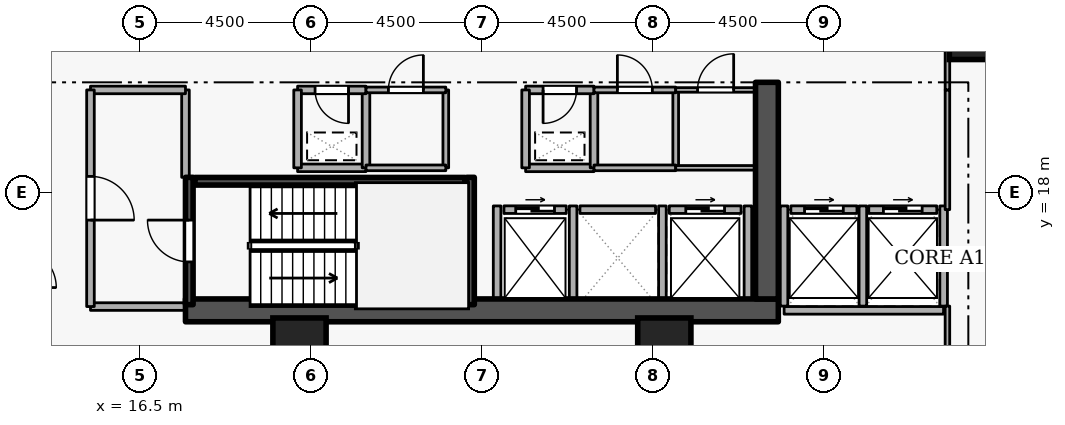
"""IFC4 building model, lengths in metres.
Left out: names, types, materials, properties, quantities, classifications, styles, units other than length and angle.
Written with IfcOpenShell. Run it as: python <this file> out.ifc"""

import sys

from ifc_helpers import new_model, si_unit, direction, frame, frame_2d, origin, origin_2d, place, context, subcontext, project, spatial, rectangle, extrude, element, fill, save


model = new_model("IFC4")
c1 = context("Model", 3, precision=1e-05, world=origin(), true_north=direction((0.0, 1.0)))
c2 = subcontext(c1, "Body", "Model", "MODEL_VIEW")
j1 = project(units=[si_unit("LENGTHUNIT", "METRE"), si_unit("PLANEANGLEUNIT", "RADIAN")], contexts=[c1])
p1 = place(None, origin())
s1 = spatial("IfcSite", under=j1, at=p1, CompositionType="ELEMENT")
p2 = place(p1, origin())
s2 = spatial("IfcBuilding", under=s1, at=p2, CompositionType="ELEMENT")
p3 = place(p2, frame((0.0, 0.0, 53.7)))
s3 = spatial("IfcBuildingStorey", under=s2, at=p3, CompositionType="ELEMENT", Elevation=53.7)
p4 = place(p3, frame((17.7, 14.9, 0.0), z_axis=(0.0, 0.0, 1.0), x_axis=(1.0, 0.0, 0.0)))
e1 = element("IfcWall", 1, at=p4, inside=s3, PredefinedType="SHEAR", context=c2, shape_type="SweptSolid", body=[
    extrude(rectangle(XDim=15.6, YDim=0.6, at=frame_2d((7.8, 0.0))), origin(), (0.0, 0.0, 1.0), 3.6),
])
p5 = place(p3, frame((33.0, 15.2, 0.0), z_axis=(0.0, 0.0, 1.0), x_axis=(0.0, 1.0, 0.0)))
e2 = element("IfcWall", 2, at=p5, inside=s3, PredefinedType="SHEAR", context=c2, shape_type="SweptSolid", body=[
    extrude(rectangle(XDim=5.7, YDim=0.6, at=frame_2d((2.85, 0.0))), origin(), (0.0, 0.0, 1.0), 3.6),
])
for number, where, z_axis, x_axis in (
    (3, (38.5, 22.2, 0.0), (0.0, 0.0, 1.0), (1.0, 0.0, 0.0)),
    (4, (20.7, 14.0, 0.0), (0.0, 0.0, 1.0), (1.0, 0.0, 0.0)),
    (5, (30.3, 14.0, 0.0), (0.0, 0.0, 1.0), (1.0, 0.0, 0.0)),
):
    element("IfcColumn", number, at=place(p3, frame(where, z_axis=z_axis, x_axis=x_axis)), inside=s3, PredefinedType="COLUMN", context=c2, shape_type="SweptSolid", body=[
        extrude(rectangle(XDim=1.4, YDim=1.4, at=origin_2d()), origin(), (0.0, 0.0, 1.0), 3.6),
    ])
p6 = place(p3, frame((26.08, 17.55, 0.0), z_axis=(0.0, 0.0, 1.0), x_axis=(1.0, 0.0, 0.0)))
e6 = element("IfcWall", 6, at=p6, inside=s3, PredefinedType="STANDARD", context=c2, shape_type="SweptSolid", body=[
    extrude(rectangle(XDim=1.64, YDim=0.2, at=frame_2d((0.82, 0.0))), origin(), (0.0, 0.0, 1.0), 3.34),
])
p7 = place(p6, frame((0.31, 0.0, 0.0)))
e7 = element("IfcOpeningElement", 7, at=p7, cuts=e6, PredefinedType="OPENING", context=c2, shape_type="SweptSolid", body=[
    extrude(rectangle(XDim=1.02, YDim=2.06, at=frame_2d((0.51, 1.03))), frame((0.0, 0.11, 0.0), z_axis=(0.0, -1.0, 0.0), x_axis=(1.0, 0.0, 0.0)), (0.0, 0.0, 1.0), 0.22),
])
p8 = place(p3, frame((28.08, 17.55, 0.0), z_axis=(0.0, 0.0, 1.0), x_axis=(1.0, 0.0, 0.0)))
e8 = element("IfcWall", 8, at=p8, inside=s3, PredefinedType="STANDARD", context=c2, shape_type="SweptSolid", body=[
    extrude(rectangle(XDim=1.99, YDim=0.2, at=frame_2d((0.995, 0.0))), origin(), (0.0, 0.0, 1.0), 3.34),
])
p9 = place(p3, frame((30.43, 17.55, 0.0), z_axis=(0.0, 0.0, 1.0), x_axis=(1.0, 0.0, 0.0)))
e9 = element("IfcWall", 9, at=p9, inside=s3, PredefinedType="STANDARD", context=c2, shape_type="SweptSolid", body=[
    extrude(rectangle(XDim=1.89, YDim=0.2, at=frame_2d((0.945, 0.0))), origin(), (0.0, 0.0, 1.0), 3.34),
])
p10 = place(p9, frame((0.435, 0.0, 0.0)))
e10 = element("IfcOpeningElement", 10, at=p10, cuts=e9, PredefinedType="OPENING", context=c2, shape_type="SweptSolid", body=[
    extrude(rectangle(XDim=1.02, YDim=2.06, at=frame_2d((0.51, 1.03))), frame((0.0, 0.11, 0.0), z_axis=(0.0, -1.0, 0.0), x_axis=(1.0, 0.0, 0.0)), (0.0, 0.0, 1.0), 0.22),
])
p11 = place(p3, frame((33.63, 17.55, 0.0), z_axis=(0.0, 0.0, 1.0), x_axis=(1.0, 0.0, 0.0)))
e11 = element("IfcWall", 11, at=p11, inside=s3, PredefinedType="STANDARD", context=c2, shape_type="SweptSolid", body=[
    extrude(rectangle(XDim=1.74, YDim=0.2, at=frame_2d((0.87, 0.0))), origin(), (0.0, 0.0, 1.0), 3.34),
])
p12 = place(p11, frame((0.36, 0.0, 0.0)))
e12 = element("IfcOpeningElement", 12, at=p12, cuts=e11, PredefinedType="OPENING", context=c2, shape_type="SweptSolid", body=[
    extrude(rectangle(XDim=1.02, YDim=2.06, at=frame_2d((0.51, 1.03))), frame((0.0, 0.11, 0.0), z_axis=(0.0, -1.0, 0.0), x_axis=(1.0, 0.0, 0.0)), (0.0, 0.0, 1.0), 0.22),
])
p13 = place(p3, frame((35.68, 17.55, 0.0), z_axis=(0.0, 0.0, 1.0), x_axis=(1.0, 0.0, 0.0)))
e13 = element("IfcWall", 13, at=p13, inside=s3, PredefinedType="STANDARD", context=c2, shape_type="SweptSolid", body=[
    extrude(rectangle(XDim=1.79, YDim=0.2, at=frame_2d((0.895, 0.0))), origin(), (0.0, 0.0, 1.0), 3.34),
])
p14 = place(p13, frame((0.385, 0.0, 0.0)))
e14 = element("IfcOpeningElement", 14, at=p14, cuts=e13, PredefinedType="OPENING", context=c2, shape_type="SweptSolid", body=[
    extrude(rectangle(XDim=1.02, YDim=2.06, at=frame_2d((0.51, 1.03))), frame((0.0, 0.11, 0.0), z_axis=(0.0, -1.0, 0.0), x_axis=(1.0, 0.0, 0.0)), (0.0, 0.0, 1.0), 0.22),
])
for number, where, z_axis, x_axis in (
    (15, (27.9, 15.212, 0.0), (0.0, 0.0, 1.0), (0.0, 1.0, 0.0)),
    (16, (25.9, 15.212, 0.0), (0.0, 0.0, 1.0), (0.0, 1.0, 0.0)),
    (17, (30.25, 15.212, 0.0), (0.0, 0.0, 1.0), (0.0, 1.0, 0.0)),
    (18, (32.5, 15.212, 0.0), (0.0, 0.0, 1.0), (0.0, 1.0, 0.0)),
):
    element("IfcWall", number, at=place(p3, frame(where, z_axis=z_axis, x_axis=x_axis)), inside=s3, PredefinedType="STANDARD", context=c2, shape_type="SweptSolid", body=[
        extrude(rectangle(XDim=2.436, YDim=0.2, at=frame_2d((1.218, 0.0))), origin(), (0.0, 0.0, 1.0), 3.34),
    ])
p15 = place(p3, frame((33.452, 14.9, 0.0), z_axis=(0.0, 0.0, 1.0), x_axis=(1.0, 0.0, 0.0)))
e19 = element("IfcWall", 19, at=p15, inside=s3, PredefinedType="STANDARD", context=c2, shape_type="SweptSolid", body=[
    extrude(rectangle(XDim=4.196, YDim=0.2, at=frame_2d((2.098, 0.0))), origin(), (0.0, 0.0, 1.0), 3.34),
])
for number, where, z_axis, x_axis in (
    (20, (35.525, 15.012, 0.0), (0.0, 0.0, 1.0), (0.0, 1.0, 0.0)),
    (21, (33.45, 15.012, 0.0), (0.0, 0.0, 1.0), (0.0, 1.0, 0.0)),
    (22, (37.65, 15.012, 0.0), (0.0, 0.0, 1.0), (0.0, 1.0, 0.0)),
):
    element("IfcWall", number, at=place(p3, frame(where, z_axis=z_axis, x_axis=x_axis)), inside=s3, PredefinedType="STANDARD", context=c2, shape_type="SweptSolid", body=[
        extrude(rectangle(XDim=2.636, YDim=0.2, at=frame_2d((1.318, 0.0))), origin(), (0.0, 0.0, 1.0), 3.34),
    ])
p16 = place(p3, frame((17.8, 15.05, 0.0), z_axis=(0.0, 0.0, 1.0), x_axis=(0.0, 1.0, 0.0)))
e23 = element("IfcWall", 23, at=p16, inside=s3, PredefinedType="SHEAR", context=c2, shape_type="SweptSolid", body=[
    extrude(rectangle(XDim=3.35, YDim=0.2, at=frame_2d((1.675, 0.0))), origin(), (0.0, 0.0, 1.0), 3.6),
])
p17 = place(p16, frame((1.125, 0.0, 0.0)))
e24 = element("IfcOpeningElement", 24, at=p17, cuts=e23, PredefinedType="OPENING", context=c2, shape_type="SweptSolid", body=[
    extrude(rectangle(XDim=1.1, YDim=2.1, at=frame_2d((0.55, 1.05))), frame((0.0, 0.11, 0.0), z_axis=(0.0, -1.0, 0.0), x_axis=(1.0, 0.0, 0.0)), (0.0, 0.0, 1.0), 0.22),
])
p18 = place(p3, frame((25.2, 18.4, 0.0), z_axis=(0.0, 0.0, 1.0), x_axis=(0.0, -1.0, 0.0)))
e25 = element("IfcWall", 25, at=p18, inside=s3, PredefinedType="SHEAR", context=c2, shape_type="SweptSolid", body=[
    extrude(rectangle(XDim=3.35, YDim=0.2, at=frame_2d((1.675, 0.0))), origin(), (0.0, 0.0, 1.0), 3.6),
])
p19 = place(p3, frame((25.05, 18.297, 0.0), z_axis=(0.0, 0.0, 1.0), x_axis=(-1.0, 0.0, 0.0)))
e26 = element("IfcWall", 26, at=p19, inside=s3, PredefinedType="SHEAR", context=c2, shape_type="SweptSolid", body=[
    extrude(rectangle(XDim=7.1, YDim=0.2, at=frame_2d((3.55, 0.0))), origin(), (0.0, 0.0, 1.0), 3.6),
])
p20 = place(p3, frame((15.2, 15.0, 0.0), z_axis=(0.0, 0.0, 1.0), x_axis=(1.0, 0.0, 0.0)))
e27 = element("IfcWall", 27, at=p20, inside=s3, PredefinedType="STANDARD", context=c2, shape_type="SweptSolid", body=[
    extrude(rectangle(XDim=2.5, YDim=0.2, at=frame_2d((1.25, 0.0))), origin(), (0.0, 0.0, 1.0), 3.34),
])
p21 = place(p3, frame((17.7, 18.4, 0.0), z_axis=(0.0, 0.0, 1.0), x_axis=(0.0, 1.0, 0.0)))
e28 = element("IfcWall", 28, at=p21, inside=s3, PredefinedType="STANDARD", context=c2, shape_type="SweptSolid", body=[
    extrude(rectangle(XDim=2.3, YDim=0.2, at=frame_2d((1.15, 0.0))), origin(), (0.0, 0.0, 1.0), 2.545),
])
p22 = place(p3, frame((17.7, 20.7, 0.0), z_axis=(0.0, 0.0, 1.0), x_axis=(-1.0, 0.0, 0.0)))
e29 = element("IfcWall", 29, at=p22, inside=s3, PredefinedType="STANDARD", context=c2, shape_type="SweptSolid", body=[
    extrude(rectangle(XDim=2.5, YDim=0.2, at=frame_2d((1.25, 0.0))), origin(), (0.0, 0.0, 1.0), 3.34),
])
p23 = place(p3, frame((15.2, 20.7, 0.0), z_axis=(0.0, 0.0, 1.0), x_axis=(0.0, -1.0, 0.0)))
e30 = element("IfcWall", 30, at=p23, inside=s3, PredefinedType="STANDARD", context=c2, shape_type="SweptSolid", body=[
    extrude(rectangle(XDim=5.7, YDim=0.2, at=frame_2d((2.85, 0.0))), origin(), (0.0, 0.0, 1.0), 3.34),
])
p24 = place(p23, frame((2.275, 0.0, 0.0)))
e31 = element("IfcOpeningElement", 31, at=p24, cuts=e30, PredefinedType="OPENING", context=c2, shape_type="SweptSolid", body=[
    extrude(rectangle(XDim=1.15, YDim=2.1, at=frame_2d((0.575, 1.05))), frame((0.0, 0.11, 0.0), z_axis=(0.0, -1.0, 0.0), x_axis=(1.0, 0.0, 0.0)), (0.0, 0.0, 1.0), 0.22),
])
p25 = place(p3, frame((26.65, 18.65, 0.0), z_axis=(0.0, 0.0, 1.0), x_axis=(1.0, 0.0, 0.0)))
e32 = element("IfcWall", 32, at=p25, inside=s3, PredefinedType="STANDARD", context=c2, shape_type="SweptSolid", body=[
    extrude(rectangle(XDim=1.8, YDim=0.2, at=frame_2d((0.9, 0.0))), origin(), (0.0, 0.0, 1.0), 3.34),
])
p26 = place(p3, frame((28.45, 18.65, 0.0), z_axis=(0.0, 0.0, 1.0), x_axis=(0.0, 1.0, 0.0)))
e33 = element("IfcWall", 33, at=p26, inside=s3, PredefinedType="STANDARD", context=c2, shape_type="SweptSolid", body=[
    extrude(rectangle(XDim=2.05, YDim=0.2, at=frame_2d((1.025, 0.0))), origin(), (0.0, 0.0, 1.0), 3.34),
])
p27 = place(p3, frame((28.45, 20.7, 0.0), z_axis=(0.0, 0.0, 1.0), x_axis=(-1.0, 0.0, 0.0)))
e34 = element("IfcWall", 34, at=p27, inside=s3, PredefinedType="STANDARD", context=c2, shape_type="SweptSolid", body=[
    extrude(rectangle(XDim=1.8, YDim=0.2, at=frame_2d((0.9, 0.0))), origin(), (0.0, 0.0, 1.0), 3.34),
])
p28 = place(p27, frame((0.46, 0.0, 0.0)))
e35 = element("IfcOpeningElement", 35, at=p28, cuts=e34, PredefinedType="OPENING", context=c2, shape_type="SweptSolid", body=[
    extrude(rectangle(XDim=0.88, YDim=2.04, at=frame_2d((0.44, 1.02))), frame((0.0, 0.11, 0.0), z_axis=(0.0, -1.0, 0.0), x_axis=(1.0, 0.0, 0.0)), (0.0, 0.0, 1.0), 0.22),
])
p29 = place(p3, frame((26.65, 20.7, 0.0), z_axis=(0.0, 0.0, 1.0), x_axis=(0.0, -1.0, 0.0)))
e36 = element("IfcWall", 36, at=p29, inside=s3, PredefinedType="STANDARD", context=c2, shape_type="SweptSolid", body=[
    extrude(rectangle(XDim=2.05, YDim=0.2, at=frame_2d((1.025, 0.0))), origin(), (0.0, 0.0, 1.0), 3.34),
])
p30 = place(p3, frame((20.65, 18.65, 0.0), z_axis=(0.0, 0.0, 1.0), x_axis=(1.0, 0.0, 0.0)))
e37 = element("IfcWall", 37, at=p30, inside=s3, PredefinedType="STANDARD", context=c2, shape_type="SweptSolid", body=[
    extrude(rectangle(XDim=1.8, YDim=0.2, at=frame_2d((0.9, 0.0))), origin(), (0.0, 0.0, 1.0), 3.34),
])
p31 = place(p3, frame((22.45, 18.65, 0.0), z_axis=(0.0, 0.0, 1.0), x_axis=(0.0, 1.0, 0.0)))
e38 = element("IfcWall", 38, at=p31, inside=s3, PredefinedType="STANDARD", context=c2, shape_type="SweptSolid", body=[
    extrude(rectangle(XDim=2.05, YDim=0.2, at=frame_2d((1.025, 0.0))), origin(), (0.0, 0.0, 1.0), 3.34),
])
p32 = place(p3, frame((22.45, 20.7, 0.0), z_axis=(0.0, 0.0, 1.0), x_axis=(-1.0, 0.0, 0.0)))
e39 = element("IfcWall", 39, at=p32, inside=s3, PredefinedType="STANDARD", context=c2, shape_type="SweptSolid", body=[
    extrude(rectangle(XDim=1.8, YDim=0.2, at=frame_2d((0.9, 0.0))), origin(), (0.0, 0.0, 1.0), 3.34),
])
p33 = place(p32, frame((0.46, 0.0, 0.0)))
e40 = element("IfcOpeningElement", 40, at=p33, cuts=e39, PredefinedType="OPENING", context=c2, shape_type="SweptSolid", body=[
    extrude(rectangle(XDim=0.88, YDim=2.04, at=frame_2d((0.44, 1.02))), frame((0.0, 0.11, 0.0), z_axis=(0.0, -1.0, 0.0), x_axis=(1.0, 0.0, 0.0)), (0.0, 0.0, 1.0), 0.22),
])
p34 = place(p3, frame((20.65, 20.7, 0.0), z_axis=(0.0, 0.0, 1.0), x_axis=(0.0, -1.0, 0.0)))
e41 = element("IfcWall", 41, at=p34, inside=s3, PredefinedType="STANDARD", context=c2, shape_type="SweptSolid", body=[
    extrude(rectangle(XDim=2.05, YDim=0.2, at=frame_2d((1.025, 0.0))), origin(), (0.0, 0.0, 1.0), 3.34),
])
p35 = place(p3, frame((24.55, 20.7, 0.0), z_axis=(0.0, 0.0, 1.0), x_axis=(0.0, -1.0, 0.0)))
e42 = element("IfcWall", 42, at=p35, inside=s3, PredefinedType="PARTITIONING", context=c2, shape_type="SweptSolid", body=[
    extrude(rectangle(XDim=2.05, YDim=0.15, at=frame_2d((1.025, 0.0))), origin(), (0.0, 0.0, 1.0), 3.34),
])
p36 = place(p3, frame((24.55, 18.65, 0.0), z_axis=(0.0, 0.0, 1.0), x_axis=(-1.0, 0.0, 0.0)))
e43 = element("IfcWall", 43, at=p36, inside=s3, PredefinedType="PARTITIONING", context=c2, shape_type="SweptSolid", body=[
    extrude(rectangle(XDim=2.1, YDim=0.15, at=frame_2d((1.05, 0.0))), origin(), (0.0, 0.0, 1.0), 3.34),
])
p37 = place(p3, frame((22.45, 20.7, 0.0), z_axis=(0.0, 0.0, 1.0), x_axis=(1.0, 0.0, 0.0)))
e44 = element("IfcWall", 44, at=p37, inside=s3, PredefinedType="PARTITIONING", context=c2, shape_type="SweptSolid", body=[
    extrude(rectangle(XDim=2.1, YDim=0.15, at=frame_2d((1.05, 0.0))), origin(), (0.0, 0.0, 1.0), 3.34),
])
p38 = place(p37, frame((0.59, 0.0, 0.0)))
e45 = element("IfcOpeningElement", 45, at=p38, cuts=e44, PredefinedType="OPENING", context=c2, shape_type="SweptSolid", body=[
    extrude(rectangle(XDim=0.92, YDim=2.08, at=frame_2d((0.46, 1.04))), frame((0.0, 0.085, 0.0), z_axis=(0.0, -1.0, 0.0), x_axis=(1.0, 0.0, 0.0)), (0.0, 0.0, 1.0), 0.17),
])
p39 = place(p3, frame((30.6, 20.7, 0.0), z_axis=(0.0, 0.0, 1.0), x_axis=(0.0, -1.0, 0.0)))
e46 = element("IfcWall", 46, at=p39, inside=s3, PredefinedType="PARTITIONING", context=c2, shape_type="SweptSolid", body=[
    extrude(rectangle(XDim=2.05, YDim=0.15, at=frame_2d((1.025, 0.0))), origin(), (0.0, 0.0, 1.0), 3.34),
])
p40 = place(p3, frame((30.6, 18.65, 0.0), z_axis=(0.0, 0.0, 1.0), x_axis=(-1.0, 0.0, 0.0)))
e47 = element("IfcWall", 47, at=p40, inside=s3, PredefinedType="PARTITIONING", context=c2, shape_type="SweptSolid", body=[
    extrude(rectangle(XDim=2.15, YDim=0.15, at=frame_2d((1.075, 0.0))), origin(), (0.0, 0.0, 1.0), 3.34),
])
p41 = place(p3, frame((28.45, 20.7, 0.0), z_axis=(0.0, 0.0, 1.0), x_axis=(1.0, 0.0, 0.0)))
e48 = element("IfcWall", 48, at=p41, inside=s3, PredefinedType="PARTITIONING", context=c2, shape_type="SweptSolid", body=[
    extrude(rectangle(XDim=2.15, YDim=0.15, at=frame_2d((1.075, 0.0))), origin(), (0.0, 0.0, 1.0), 3.34),
])
p42 = place(p41, frame((0.615, 0.0, 0.0)))
e49 = element("IfcOpeningElement", 49, at=p42, cuts=e48, PredefinedType="OPENING", context=c2, shape_type="SweptSolid", body=[
    extrude(rectangle(XDim=0.92, YDim=2.08, at=frame_2d((0.46, 1.04))), frame((0.0, 0.085, 0.0), z_axis=(0.0, -1.0, 0.0), x_axis=(1.0, 0.0, 0.0)), (0.0, 0.0, 1.0), 0.17),
])
p43 = place(p3, frame((32.7, 18.65, 0.0), z_axis=(0.0, 0.0, 1.0), x_axis=(-1.0, 0.0, 0.0)))
e50 = element("IfcWall", 50, at=p43, inside=s3, PredefinedType="PARTITIONING", context=c2, shape_type="SweptSolid", body=[
    extrude(rectangle(XDim=2.1, YDim=0.12, at=frame_2d((1.05, 0.0))), origin(), (0.0, 0.0, 1.0), 3.34),
])
p44 = place(p3, frame((30.6, 20.7, 0.0), z_axis=(0.0, 0.0, 1.0), x_axis=(1.0, 0.0, 0.0)))
e51 = element("IfcWall", 51, at=p44, inside=s3, PredefinedType="PARTITIONING", context=c2, shape_type="SweptSolid", body=[
    extrude(rectangle(XDim=2.1, YDim=0.12, at=frame_2d((1.05, 0.0))), origin(), (0.0, 0.0, 1.0), 3.34),
])
p45 = place(p44, frame((0.575, 0.0, 0.0)))
e52 = element("IfcOpeningElement", 52, at=p45, cuts=e51, PredefinedType="OPENING", context=c2, shape_type="SweptSolid", body=[
    extrude(rectangle(XDim=0.95, YDim=2.1, at=frame_2d((0.475, 1.05))), frame((0.0, 0.07, 0.0), z_axis=(0.0, -1.0, 0.0), x_axis=(1.0, 0.0, 0.0)), (0.0, 0.0, 1.0), 0.14),
])
p46 = place(p3, frame((37.75, 17.55, 0.0), z_axis=(0.0, 0.0, 1.0), x_axis=(0.0, 1.0, 0.0)))
e53 = element("IfcWall", 53, at=p46, inside=s3, PredefinedType="PARTITIONING", context=c2, shape_type="SweptSolid", body=[
    extrude(rectangle(XDim=3.15, YDim=0.12, at=frame_2d((1.575, 0.0))), origin(), (0.0, 0.0, 1.0), 3.34),
])
p47 = place(p3, frame((37.75, 20.7, 0.0), z_axis=(0.0, 0.0, 1.0), x_axis=(0.0, 1.0, 0.0)))
e54 = element("IfcWall", 54, at=p47, inside=s3, PredefinedType="PARTITIONING", context=c2, shape_type="SweptSolid", body=[
    extrude(rectangle(XDim=1.85, YDim=0.12, at=frame_2d((0.925, 0.0))), origin(), (0.0, 0.0, 1.0), 3.34),
])
p48 = place(p3, frame((37.75, 13.15, 0.0), z_axis=(0.0, 0.0, 1.0), x_axis=(0.0, 1.0, 0.0)))
e55 = element("IfcWall", 55, at=p48, inside=s3, PredefinedType="PARTITIONING", context=c2, shape_type="SweptSolid", body=[
    extrude(rectangle(XDim=1.862, YDim=0.12, at=frame_2d((0.931, 0.0))), origin(), (0.0, 0.0, 1.0), 3.34),
])
p49 = place(p7, origin())
e56 = element("IfcDoor", 56, at=p49, inside=s3, OperationType="SLIDING_TO_LEFT", PredefinedType="DOOR", context=c2, shape_type="SweptSolid", body=[
    extrude(rectangle(XDim=1.02, YDim=2.06, at=frame_2d((0.51, 1.03))), frame((0.0, 0.025, 0.0), z_axis=(0.0, -1.0, 0.0), x_axis=(1.0, 0.0, 0.0)), (0.0, 0.0, 1.0), 0.05),
])
fill(e7, e56)
p50 = place(p10, origin())
e57 = element("IfcDoor", 57, at=p50, inside=s3, OperationType="SLIDING_TO_LEFT", PredefinedType="DOOR", context=c2, shape_type="SweptSolid", body=[
    extrude(rectangle(XDim=1.02, YDim=2.06, at=frame_2d((0.51, 1.03))), frame((0.0, 0.025, 0.0), z_axis=(0.0, -1.0, 0.0), x_axis=(1.0, 0.0, 0.0)), (0.0, 0.0, 1.0), 0.05),
])
fill(e10, e57)
p51 = place(p12, origin())
e58 = element("IfcDoor", 58, at=p51, inside=s3, OperationType="SLIDING_TO_LEFT", PredefinedType="DOOR", context=c2, shape_type="SweptSolid", body=[
    extrude(rectangle(XDim=1.02, YDim=2.06, at=frame_2d((0.51, 1.03))), frame((0.0, 0.025, 0.0), z_axis=(0.0, -1.0, 0.0), x_axis=(1.0, 0.0, 0.0)), (0.0, 0.0, 1.0), 0.05),
])
fill(e12, e58)
p52 = place(p14, origin())
e59 = element("IfcDoor", 59, at=p52, inside=s3, OperationType="SLIDING_TO_LEFT", PredefinedType="DOOR", context=c2, shape_type="SweptSolid", body=[
    extrude(rectangle(XDim=1.02, YDim=2.06, at=frame_2d((0.51, 1.03))), frame((0.0, 0.025, 0.0), z_axis=(0.0, -1.0, 0.0), x_axis=(1.0, 0.0, 0.0)), (0.0, 0.0, 1.0), 0.05),
])
fill(e14, e59)
p53 = place(p17, origin())
e60 = element("IfcDoor", 60, at=p53, inside=s3, OperationType="SINGLE_SWING_RIGHT", PredefinedType="DOOR", context=c2, shape_type="SweptSolid", body=[
    extrude(rectangle(XDim=1.1, YDim=2.1, at=frame_2d((0.55, 1.05))), frame((0.0, 0.025, 0.0), z_axis=(0.0, -1.0, 0.0), x_axis=(1.0, 0.0, 0.0)), (0.0, 0.0, 1.0), 0.05),
])
fill(e24, e60)
p54 = place(p24, origin())
e61 = element("IfcDoor", 61, at=p54, inside=s3, OperationType="SINGLE_SWING_RIGHT", PredefinedType="DOOR", context=c2, shape_type="SweptSolid", body=[
    extrude(rectangle(XDim=1.15, YDim=2.1, at=frame_2d((0.575, 1.05))), frame((0.0, 0.025, 0.0), z_axis=(0.0, -1.0, 0.0), x_axis=(1.0, 0.0, 0.0)), (0.0, 0.0, 1.0), 0.05),
])
fill(e31, e61)
p55 = place(p28, origin())
e62 = element("IfcDoor", 62, at=p55, inside=s3, OperationType="SINGLE_SWING_RIGHT", PredefinedType="DOOR", context=c2, shape_type="SweptSolid", body=[
    extrude(rectangle(XDim=0.88, YDim=2.04, at=frame_2d((0.44, 1.02))), frame((0.0, 0.025, 0.0), z_axis=(0.0, -1.0, 0.0), x_axis=(1.0, 0.0, 0.0)), (0.0, 0.0, 1.0), 0.05),
])
fill(e35, e62)
p56 = place(p33, origin())
e63 = element("IfcDoor", 63, at=p56, inside=s3, OperationType="SINGLE_SWING_LEFT", PredefinedType="DOOR", context=c2, shape_type="SweptSolid", body=[
    extrude(rectangle(XDim=0.88, YDim=2.04, at=frame_2d((0.44, 1.02))), frame((0.0, 0.025, 0.0), z_axis=(0.0, -1.0, 0.0), x_axis=(1.0, 0.0, 0.0)), (0.0, 0.0, 1.0), 0.05),
])
fill(e40, e63)
p57 = place(p38, origin())
e64 = element("IfcDoor", 64, at=p57, inside=s3, OperationType="SINGLE_SWING_RIGHT", PredefinedType="DOOR", context=c2, shape_type="SweptSolid", body=[
    extrude(rectangle(XDim=0.92, YDim=2.08, at=frame_2d((0.46, 1.04))), frame((0.0, 0.025, 0.0), z_axis=(0.0, -1.0, 0.0), x_axis=(1.0, 0.0, 0.0)), (0.0, 0.0, 1.0), 0.05),
])
fill(e45, e64)
p58 = place(p42, origin())
e65 = element("IfcDoor", 65, at=p58, inside=s3, OperationType="SINGLE_SWING_LEFT", PredefinedType="DOOR", context=c2, shape_type="SweptSolid", body=[
    extrude(rectangle(XDim=0.92, YDim=2.08, at=frame_2d((0.46, 1.04))), frame((0.0, 0.025, 0.0), z_axis=(0.0, -1.0, 0.0), x_axis=(1.0, 0.0, 0.0)), (0.0, 0.0, 1.0), 0.05),
])
fill(e49, e65)
p59 = place(p45, origin())
e66 = element("IfcDoor", 66, at=p59, inside=s3, OperationType="SINGLE_SWING_RIGHT", PredefinedType="DOOR", context=c2, shape_type="SweptSolid", body=[
    extrude(rectangle(XDim=0.95, YDim=2.1, at=frame_2d((0.475, 1.05))), frame((0.0, 0.025, 0.0), z_axis=(0.0, -1.0, 0.0), x_axis=(1.0, 0.0, 0.0)), (0.0, 0.0, 1.0), 0.05),
])
fill(e52, e66)
save(model, sys.argv[1])
